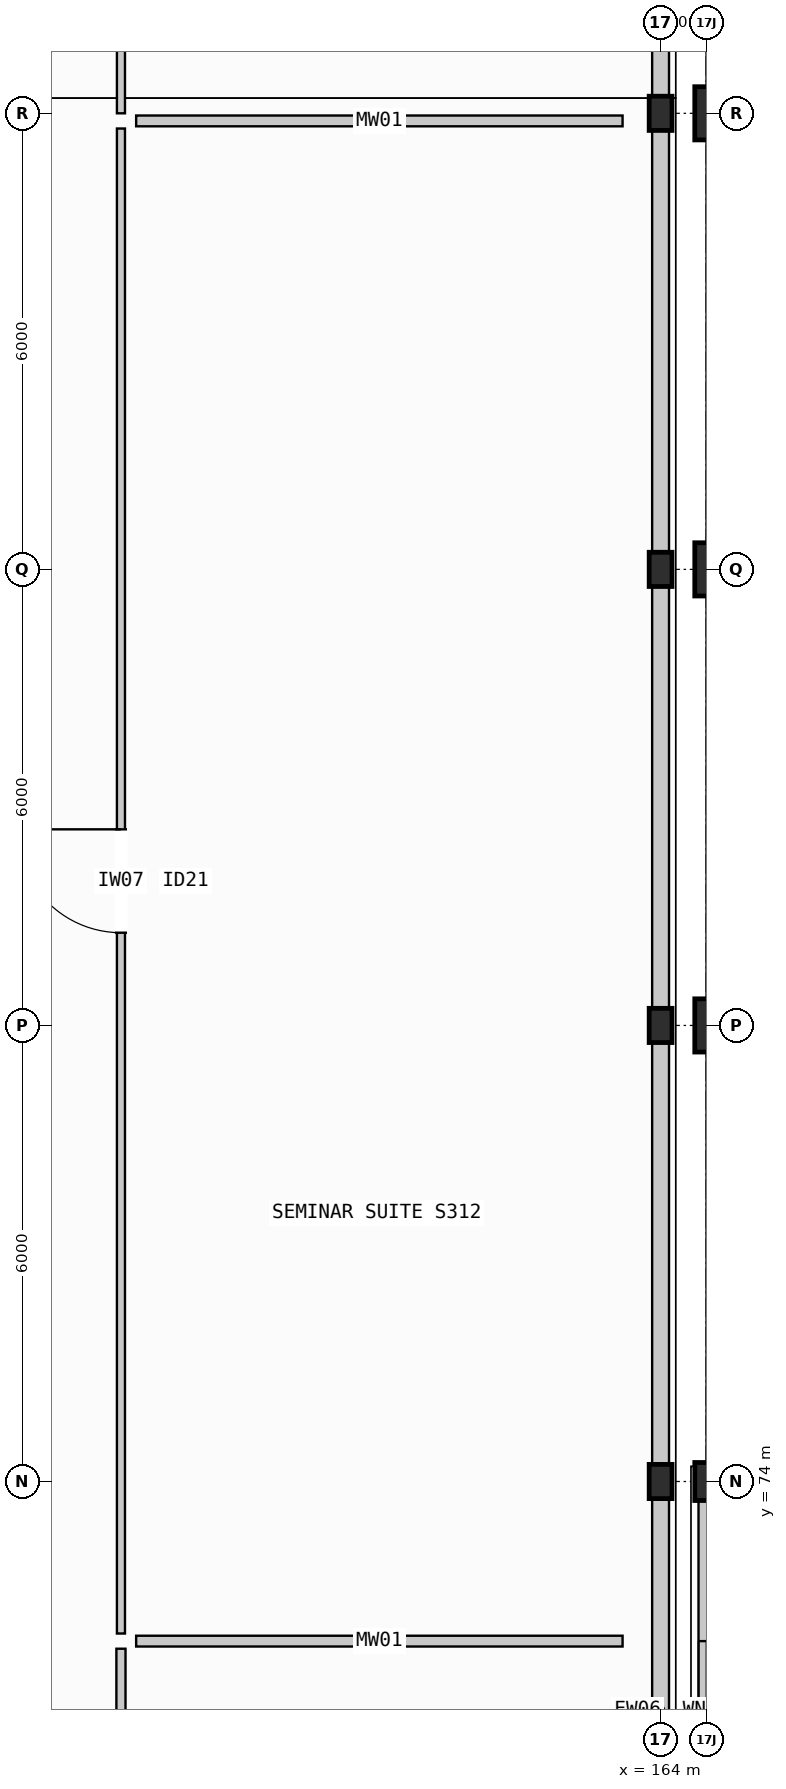
"""IFC4 building model, lengths in metres.
Left out: names, types, materials, properties, quantities, classifications, styles, units other than length and angle.
Written with IfcOpenShell. Run it as: python <this file> out.ifc"""

import sys

from ifc_helpers import new_model, si_unit, direction, frame, frame_2d, origin, origin_2d, place, context, subcontext, project, spatial, rectangle, i_section, extrude, element, fill, save


model = new_model("IFC4")
c1 = context("Model", 3, precision=1e-05, world=origin(), true_north=direction((0.0, 1.0)))
c2 = subcontext(c1, "Body", "Model", "MODEL_VIEW")
j1 = project(units=[si_unit("LENGTHUNIT", "METRE"), si_unit("PLANEANGLEUNIT", "RADIAN")], contexts=[c1])
p1 = place(None, origin())
s1 = spatial("IfcSite", under=j1, at=p1, CompositionType="ELEMENT")
p2 = place(p1, origin())
s2 = spatial("IfcBuilding", under=s1, at=p2, CompositionType="ELEMENT")
p3 = place(p2, frame((0.0, 0.0, 16.8)))
s3 = spatial("IfcBuildingStorey", under=s2, at=p3, CompositionType="ELEMENT", Elevation=16.8)
for number, where, z_axis, x_axis in (
    (1, (164.0, 74.0, 0.0), (0.0, 0.0, 1.0), (1.0, 0.0, 0.0)),
    (2, (164.0, 80.0, 0.0), (0.0, 0.0, 1.0), (1.0, 0.0, 0.0)),
    (3, (164.0, 86.0, 0.0), (0.0, 0.0, 1.0), (1.0, 0.0, 0.0)),
    (4, (164.0, 92.0, 0.0), (0.0, 0.0, 1.0), (1.0, 0.0, 0.0)),
):
    element("IfcColumn", number, at=place(p3, frame(where, z_axis=z_axis, x_axis=x_axis)), inside=s3, PredefinedType="COLUMN", context=c2, shape_type="SweptSolid", body=[
        extrude(i_section(OverallWidth=0.3, OverallDepth=0.45, WebThickness=0.014, FlangeThickness=0.026, FilletRadius=0.027, at=origin_2d()), origin(), (0.0, 0.0, 1.0), 4.8),
    ])
p4 = place(p3, frame((164.6, 74.0, 0.0), z_axis=(0.0, 0.0, 1.0), x_axis=(1.0, 0.0, 0.0)))
e5 = element("IfcColumn", 5, at=p4, inside=s3, PredefinedType="COLUMN", context=c2, shape_type="SweptSolid", body=[
    extrude(i_section(OverallWidth=0.3, OverallDepth=0.5, WebThickness=0.014, FlangeThickness=0.028, FilletRadius=0.027, at=origin_2d()), origin(), (0.0, 0.0, 1.0), 5.0),
])
for number, where, z_axis, x_axis in (
    (6, (164.6, 80.0, 0.0), (0.0, 0.0, 1.0), (1.0, 0.0, 0.0)),
    (7, (164.6, 86.0, 0.0), (0.0, 0.0, 1.0), (1.0, 0.0, 0.0)),
    (8, (164.6, 92.0, 0.0), (0.0, 0.0, 1.0), (1.0, 0.0, 0.0)),
):
    element("IfcColumn", number, at=place(p3, frame(where, z_axis=z_axis, x_axis=x_axis)), inside=s3, PredefinedType="COLUMN", context=c2, shape_type="SweptSolid", body=[
        extrude(i_section(OverallWidth=0.3, OverallDepth=0.7, WebThickness=0.017, FlangeThickness=0.032, FilletRadius=0.027, at=origin_2d()), origin(), (0.0, 0.0, 1.0), 5.0),
    ])
p5 = place(p3, frame((164.6, 68.246, 0.0), z_axis=(0.0, 0.0, 1.0), x_axis=(0.0, 1.0, 0.0)))
e9 = element("IfcWall", 9, at=p5, inside=s3, PredefinedType="STANDARD", context=c2, shape_type="SweptSolid", body=[
    extrude(rectangle(XDim=5.508, YDim=0.202, at=frame_2d((2.754, 0.0))), origin(), (0.0, 0.0, 1.0), 4.2),
])
p6 = place(p5, frame((1.854, 0.0, 1.0)))
e10 = element("IfcOpeningElement", 10, at=p6, cuts=e9, PredefinedType="OPENING", context=c2, shape_type="SweptSolid", body=[
    extrude(rectangle(XDim=1.8, YDim=2.1, at=frame_2d((0.9, 1.05))), frame((0.0, 0.111, 0.0), z_axis=(0.0, -1.0, 0.0), x_axis=(1.0, 0.0, 0.0)), (0.0, 0.0, 1.0), 0.222),
])
for number, where, z_axis, x_axis in (
    (11, (164.0, 68.221, 0.0), (0.0, 0.0, 1.0), (0.0, 1.0, 0.0)),
    (12, (164.0, 74.221, 0.0), (0.0, 0.0, 1.0), (0.0, 1.0, 0.0)),
    (13, (164.0, 80.221, 0.0), (0.0, 0.0, 1.0), (0.0, 1.0, 0.0)),
    (14, (164.0, 86.221, 0.0), (0.0, 0.0, 1.0), (0.0, 1.0, 0.0)),
    (15, (164.0, 92.221, 0.0), (0.0, 0.0, 1.0), (0.0, 1.0, 0.0)),
):
    element("IfcWall", number, at=place(p3, frame(where, z_axis=z_axis, x_axis=x_axis)), inside=s3, PredefinedType="STANDARD", context=c2, shape_type="SweptSolid", body=[
        extrude(rectangle(XDim=5.558, YDim=0.222, at=frame_2d((2.779, 0.0))), origin(), (0.0, 0.0, 1.0), 3.965),
    ])
p7 = place(p3, frame((156.9, 52.0, 0.0), z_axis=(0.0, 0.0, 1.0), x_axis=(0.0, 1.0, 0.0)))
e16 = element("IfcWall", 16, at=p7, inside=s3, PredefinedType="PARTITIONING", context=c2, shape_type="SweptSolid", body=[
    extrude(rectangle(XDim=19.8, YDim=0.12, at=frame_2d((9.9, 0.0))), origin(), (0.0, 0.0, 1.0), 3.965),
])
p8 = place(p7, frame((9.41, 0.0, 0.0)))
e17 = element("IfcOpeningElement", 17, at=p8, cuts=e16, PredefinedType="OPENING", context=c2, shape_type="SweptSolid", body=[
    extrude(rectangle(XDim=0.98, YDim=2.14, at=frame_2d((0.49, 1.07))), frame((0.0, 0.07, 0.0), z_axis=(0.0, -1.0, 0.0), x_axis=(1.0, 0.0, 0.0)), (0.0, 0.0, 1.0), 0.14),
])
p9 = place(p3, frame((156.9, 72.0, 0.0), z_axis=(0.0, 0.0, 1.0), x_axis=(0.0, 1.0, 0.0)))
e18 = element("IfcWall", 18, at=p9, inside=s3, PredefinedType="PARTITIONING", context=c2, shape_type="SweptSolid", body=[
    extrude(rectangle(XDim=19.8, YDim=0.106, at=frame_2d((9.9, 0.0))), origin(), (0.0, 0.0, 1.0), 3.965),
])
p10 = place(p9, frame((9.22, 0.0, 0.0)))
e19 = element("IfcOpeningElement", 19, at=p10, cuts=e18, PredefinedType="OPENING", context=c2, shape_type="SweptSolid", body=[
    extrude(rectangle(XDim=1.36, YDim=2.3, at=frame_2d((0.68, 1.15))), frame((0.0, 0.063, 0.0), z_axis=(0.0, -1.0, 0.0), x_axis=(1.0, 0.0, 0.0)), (0.0, 0.0, 1.0), 0.126),
])
p11 = place(p3, frame((156.9, 92.0, 0.0), z_axis=(0.0, 0.0, 1.0), x_axis=(0.0, 1.0, 0.0)))
e20 = element("IfcWall", 20, at=p11, inside=s3, PredefinedType="PARTITIONING", context=c2, shape_type="SweptSolid", body=[
    extrude(rectangle(XDim=18.2, YDim=0.106, at=frame_2d((9.1, 0.0))), origin(), (0.0, 0.0, 1.0), 3.965),
])
p12 = place(p11, frame((8.63, 0.0, 0.0)))
e21 = element("IfcOpeningElement", 21, at=p12, cuts=e20, PredefinedType="OPENING", context=c2, shape_type="SweptSolid", body=[
    extrude(rectangle(XDim=0.94, YDim=2.12, at=frame_2d((0.47, 1.06))), frame((0.0, 0.063, 0.0), z_axis=(0.0, -1.0, 0.0), x_axis=(1.0, 0.0, 0.0)), (0.0, 0.0, 1.0), 0.126),
])
p13 = place(p3, frame((157.1, 71.9, 0.0), z_axis=(0.0, 0.0, 1.0), x_axis=(1.0, 0.0, 0.0)))
e22 = element("IfcWall", 22, at=p13, inside=s3, PredefinedType="MOVABLE", context=c2, shape_type="SweptSolid", body=[
    extrude(rectangle(XDim=6.4, YDim=0.142, at=frame_2d((3.2, 0.0))), origin(), (0.0, 0.0, 1.0), 4.0),
])
p14 = place(p3, frame((157.1, 91.9, 0.0), z_axis=(0.0, 0.0, 1.0), x_axis=(1.0, 0.0, 0.0)))
e23 = element("IfcWall", 23, at=p14, inside=s3, PredefinedType="MOVABLE", context=c2, shape_type="SweptSolid", body=[
    extrude(rectangle(XDim=6.4, YDim=0.142, at=frame_2d((3.2, 0.0))), origin(), (0.0, 0.0, 1.0), 3.965),
])
p15 = place(p6, origin())
e24 = element("IfcWindow", 24, at=p15, inside=s3, PartitioningType="SINGLE_PANEL", PredefinedType="WINDOW", context=c2, shape_type="SweptSolid", body=[
    extrude(rectangle(XDim=1.8, YDim=2.1, at=frame_2d((0.9, 1.05))), frame((0.0, 0.03, 0.0), z_axis=(0.0, -1.0, 0.0), x_axis=(1.0, 0.0, 0.0)), (0.0, 0.0, 1.0), 0.06),
])
fill(e10, e24)
p16 = place(p10, origin())
e25 = element("IfcDoor", 25, at=p16, inside=s3, OperationType="SINGLE_SWING_RIGHT", PredefinedType="DOOR", context=c2, shape_type="SweptSolid", body=[
    extrude(rectangle(XDim=1.36, YDim=2.3, at=frame_2d((0.68, 1.15))), frame((0.0, 0.025, 0.0), z_axis=(0.0, -1.0, 0.0), x_axis=(1.0, 0.0, 0.0)), (0.0, 0.0, 1.0), 0.05),
])
fill(e19, e25)
save(model, sys.argv[1])
